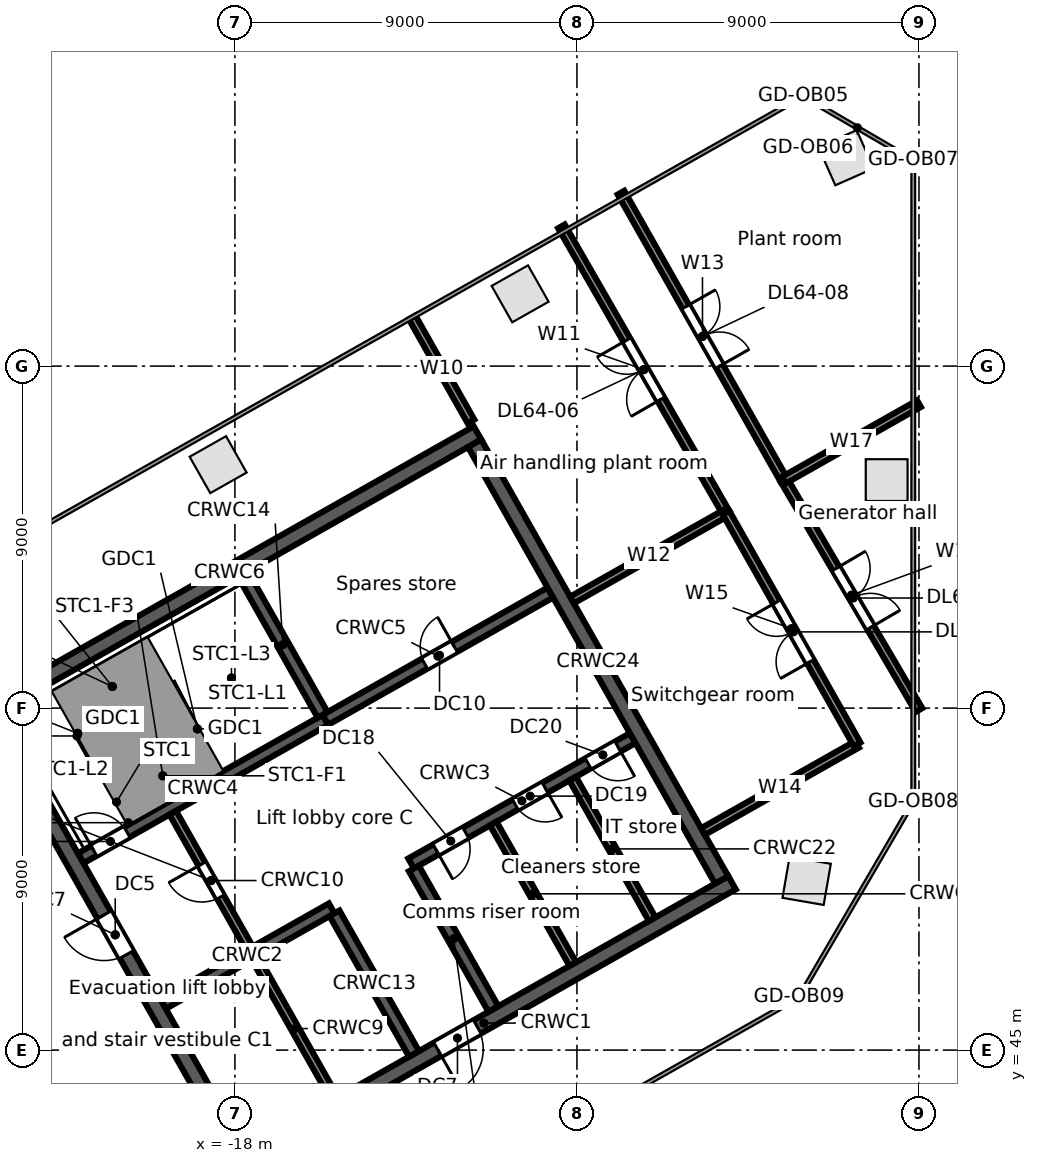
"""IFC4 building model, lengths in metres.
Left out: names, types, materials, properties, quantities, classifications, styles, units other than length and angle.
Written with IfcOpenShell. Run it as: python <this file> out.ifc"""

import sys

from ifc_helpers import new_model, si_unit, direction, frame, frame_2d, origin, origin_2d, place, context, subcontext, project, spatial, rectangle, extrude, element, fill, save


model = new_model("IFC4")
c1 = context("Model", 3, precision=1e-05, world=origin(), true_north=direction((0.0, 1.0)))
c2 = subcontext(c1, "Body", "Model", "MODEL_VIEW")
j1 = project(units=[si_unit("LENGTHUNIT", "METRE"), si_unit("PLANEANGLEUNIT", "RADIAN")], contexts=[c1])
p1 = place(None, origin())
s1 = spatial("IfcSite", under=j1, at=p1, CompositionType="ELEMENT")
p2 = place(p1, origin())
s2 = spatial("IfcBuilding", under=s1, at=p2, CompositionType="ELEMENT")
p3 = place(p2, frame((0.0, 0.0, 285.5)))
s3 = spatial("IfcBuildingStorey", under=s2, at=p3, CompositionType="ELEMENT", Elevation=285.5)
for number, where, z_axis, x_axis in (
    (1, (-10.495, 64.902, 0.0), (0.0, 0.0, 1.0), (-0.87, -0.492, 0.0)),
    (2, (-18.441, 60.406, 0.0), (0.0, 0.0, 1.0), (-0.87, -0.492, 0.0)),
    (3, (-2.955, 49.456, 0.0), (0.0, 0.0, 1.0), (-0.985, 0.171, 0.0)),
    (4, (-0.85, 60.0, 0.0), (0.0, 0.0, 1.0), (0.0, 1.0, 0.0)),
    (5, (-1.92, 68.483, 0.0), (0.0, 0.0, 1.0), (-0.915, -0.404, 0.0)),
):
    element("IfcColumn", number, at=place(p3, frame(where, z_axis=z_axis, x_axis=x_axis)), inside=s3, PredefinedType="COLUMN", context=c2, shape_type="SweptSolid", body=[
        extrude(rectangle(XDim=1.1, YDim=1.1, at=origin_2d()), origin(), (0.0, 0.0, 1.0), 7.6),
    ])
p4 = place(p3, frame((-17.975, 42.017, 0.0), z_axis=(0.0, 0.0, 1.0), x_axis=(0.87034965173, 0.492434243055, 0.0)))
e6 = element("IfcWall", 6, at=p4, inside=s3, PredefinedType="SOLIDWALL", context=c2, shape_type="SweptSolid", body=[
    extrude(rectangle(XDim=15.0, YDim=0.4, at=frame_2d((7.5, 0.0))), origin(), (0.0, 0.0, 1.0), 7.32),
])
p5 = place(p4, frame((6.1, 0.0, 0.0)))
e7 = element("IfcOpeningElement", 7, at=p5, cuts=e6, PredefinedType="OPENING", context=c2, shape_type="SweptSolid", body=[
    extrude(rectangle(XDim=1.2, YDim=2.1, at=frame_2d((0.6, 1.05))), frame((0.0, 0.21, 0.0), z_axis=(0.0, -1.0, 0.0), x_axis=(1.0, 0.0, 0.0)), (0.0, 0.0, 1.0), 0.42),
])
p6 = place(p3, frame((-19.892, 46.218, 0.0), z_axis=(0.0, 0.0, 1.0), x_axis=(0.870341639186, 0.492448404505, 0.0)))
e8 = element("IfcWall", 8, at=p6, inside=s3, PredefinedType="SOLIDWALL", context=c2, shape_type="SweptSolid", body=[
    extrude(rectangle(XDim=5.1, YDim=0.3, at=frame_2d((2.55, 0.0))), origin(), (0.0, 0.0, 1.0), 7.32),
])
p7 = place(p3, frame((-13.365, 49.911, 0.0), z_axis=(0.0, 0.0, 1.0), x_axis=(0.870347618718, 0.492437836272, 0.0)))
e9 = element("IfcWall", 9, at=p7, inside=s3, PredefinedType="SOLIDWALL", context=c2, shape_type="SweptSolid", body=[
    extrude(rectangle(XDim=6.7, YDim=0.3, at=frame_2d((3.35, 0.0))), origin(), (0.0, 0.0, 1.0), 7.32),
])
p8 = place(p7, frame((0.75, 0.0, 0.0)))
e10 = element("IfcOpeningElement", 10, at=p8, cuts=e9, PredefinedType="OPENING", context=c2, shape_type="SweptSolid", body=[
    extrude(rectangle(XDim=0.9, YDim=2.1, at=frame_2d((0.45, 1.05))), frame((0.0, 0.16, 0.0), z_axis=(0.0, -1.0, 0.0), x_axis=(1.0, 0.0, 0.0)), (0.0, 0.0, 1.0), 0.32),
])
p9 = place(p7, frame((3.15, 0.0, 0.0)))
e11 = element("IfcOpeningElement", 11, at=p9, cuts=e9, PredefinedType="OPENING", context=c2, shape_type="SweptSolid", body=[
    extrude(rectangle(XDim=0.9, YDim=2.1, at=frame_2d((0.45, 1.05))), frame((0.0, 0.16, 0.0), z_axis=(0.0, -1.0, 0.0), x_axis=(1.0, 0.0, 0.0)), (0.0, 0.0, 1.0), 0.32),
])
p10 = place(p7, frame((5.35, 0.0, 0.0)))
e12 = element("IfcOpeningElement", 12, at=p10, cuts=e9, PredefinedType="OPENING", context=c2, shape_type="SweptSolid", body=[
    extrude(rectangle(XDim=0.9, YDim=2.1, at=frame_2d((0.45, 1.05))), frame((0.0, 0.16, 0.0), z_axis=(0.0, -1.0, 0.0), x_axis=(1.0, 0.0, 0.0)), (0.0, 0.0, 1.0), 0.32),
])
p11 = place(p3, frame((-22.059, 50.047, 0.0), z_axis=(0.0, 0.0, 1.0), x_axis=(0.87035077051, 0.49243226567, 0.0)))
e13 = element("IfcWall", 13, at=p11, inside=s3, PredefinedType="SOLIDWALL", context=c2, shape_type="SweptSolid", body=[
    extrude(rectangle(XDim=7.4, YDim=0.3, at=frame_2d((3.7, 0.0))), origin(), (0.0, 0.0, 1.0), 7.32),
])
p12 = place(p11, frame((0.4, 0.0, 0.0)))
e14 = element("IfcOpeningElement", 14, at=p12, cuts=e13, PredefinedType="OPENING", context=c2, shape_type="SweptSolid", body=[
    extrude(rectangle(XDim=1.0, YDim=2.1, at=frame_2d((0.5, 1.05))), frame((0.0, 0.16, 0.0), z_axis=(0.0, -1.0, 0.0), x_axis=(1.0, 0.0, 0.0)), (0.0, 0.0, 1.0), 0.32),
])
p13 = place(p3, frame((-15.618, 53.691, 0.0), z_axis=(0.0, 0.0, 1.0), x_axis=(0.870362830851, 0.492410948978, 0.0)))
e15 = element("IfcWall", 15, at=p13, inside=s3, PredefinedType="SOLIDWALL", context=c2, shape_type="SweptSolid", body=[
    extrude(rectangle(XDim=6.8, YDim=0.3, at=frame_2d((3.4, 0.0))), origin(), (0.0, 0.0, 1.0), 7.32),
])
p14 = place(p13, frame((3.0, 0.0, 0.0)))
e16 = element("IfcOpeningElement", 16, at=p14, cuts=e15, PredefinedType="OPENING", context=c2, shape_type="SweptSolid", body=[
    extrude(rectangle(XDim=0.9, YDim=2.1, at=frame_2d((0.45, 1.05))), frame((0.0, 0.16, 0.0), z_axis=(0.0, -1.0, 0.0), x_axis=(1.0, 0.0, 0.0)), (0.0, 0.0, 1.0), 0.32),
])
p15 = place(p3, frame((-24.672, 53.854, 0.0), z_axis=(0.0, 0.0, 1.0), x_axis=(0.870353598469, 0.492427267353, 0.0)))
e17 = element("IfcWall", 17, at=p15, inside=s3, PredefinedType="SOLIDWALL", context=c2, shape_type="SweptSolid", body=[
    extrude(rectangle(XDim=15.0, YDim=0.4, at=frame_2d((7.5, 0.0))), origin(), (0.0, 0.0, 1.0), 7.32),
])
p16 = place(p3, frame((-24.4, 53.779, 0.0), z_axis=(0.0, 0.0, 1.0), x_axis=(0.492421663121, -0.870356769198, 0.0)))
e18 = element("IfcWall", 18, at=p16, inside=s3, PredefinedType="SOLIDWALL", context=c2, shape_type="SweptSolid", body=[
    extrude(rectangle(XDim=13.2, YDim=0.4, at=frame_2d((6.6, 0.0))), origin(), (0.0, 0.0, 1.0), 7.32),
])
p17 = place(p16, frame((6.0, 0.0, 0.0)))
e19 = element("IfcOpeningElement", 19, at=p17, cuts=e18, PredefinedType="OPENING", context=c2, shape_type="SweptSolid", body=[
    extrude(rectangle(XDim=1.2, YDim=2.1, at=frame_2d((0.6, 1.05))), frame((0.0, 0.21, 0.0), z_axis=(0.0, -1.0, 0.0), x_axis=(1.0, 0.0, 0.0)), (0.0, 0.0, 1.0), 0.42),
])
p18 = place(p3, frame((-17.469, 47.417, 0.0), z_axis=(0.0, 0.0, 1.0), x_axis=(0.492466057713, -0.870331650579, 0.0)))
e20 = element("IfcWall", 20, at=p18, inside=s3, PredefinedType="SOLIDWALL", context=c2, shape_type="SweptSolid", body=[
    extrude(rectangle(XDim=4.25, YDim=0.2, at=frame_2d((2.125, 0.0))), origin(), (0.0, 0.0, 1.0), 7.32),
])
p19 = place(p3, frame((-19.635, 51.246, 0.0), z_axis=(0.0, 0.0, 1.0), x_axis=(0.492408451753, -0.87036424366, 0.0)))
e21 = element("IfcWall", 21, at=p19, inside=s3, PredefinedType="PARTITIONING", context=c2, shape_type="SweptSolid", body=[
    extrude(rectangle(XDim=4.1, YDim=0.2, at=frame_2d((2.05, 0.0))), origin(), (0.0, 0.0, 1.0), 7.32),
])
p20 = place(p19, frame((1.55, 0.0, 0.0)))
e22 = element("IfcOpeningElement", 22, at=p20, cuts=e21, PredefinedType="OPENING", context=c2, shape_type="SweptSolid", body=[
    extrude(rectangle(XDim=1.0, YDim=2.1, at=frame_2d((0.5, 1.05))), frame((0.0, 0.11, 0.0), z_axis=(0.0, -1.0, 0.0), x_axis=(1.0, 0.0, 0.0)), (0.0, 0.0, 1.0), 0.22),
])
for number, where, z_axis, x_axis in (
    (23, (-15.379, 48.599, 0.0), (0.0, 0.0, 1.0), (0.492, -0.87, 0.0)),
    (24, (-17.785, 57.521, 0.0), (0.0, 0.0, 1.0), (0.492, -0.87, 0.0)),
):
    element("IfcWall", number, at=place(p3, frame(where, z_axis=z_axis, x_axis=x_axis)), inside=s3, PredefinedType="SOLIDWALL", context=c2, shape_type="SweptSolid", body=[
        extrude(rectangle(XDim=4.25, YDim=0.3, at=frame_2d((2.125, 0.0))), origin(), (0.0, 0.0, 1.0), 7.32),
    ])
p21 = place(p3, frame((-13.291, 49.781, 0.0), z_axis=(0.0, 0.0, 1.0), x_axis=(0.492397924348, -0.870370199454, 0.0)))
e25 = element("IfcWall", 25, at=p21, inside=s3, PredefinedType="SOLIDWALL", context=c2, shape_type="SweptSolid", body=[
    extrude(rectangle(XDim=4.25, YDim=0.3, at=frame_2d((2.125, 0.0))), origin(), (0.0, 0.0, 1.0), 7.32),
])
p22 = place(p3, frame((-11.202, 50.962, 0.0), z_axis=(0.0, 0.0, 1.0), x_axis=(0.492441437811, -0.870345580977, 0.0)))
e26 = element("IfcWall", 26, at=p22, inside=s3, PredefinedType="PARTITIONING", context=c2, shape_type="SweptSolid", body=[
    extrude(rectangle(XDim=4.25, YDim=0.2, at=frame_2d((2.125, 0.0))), origin(), (0.0, 0.0, 1.0), 7.32),
])
p23 = place(p3, frame((-9.113, 52.144, 0.0), z_axis=(0.0, 0.0, 1.0), x_axis=(0.492422543467, -0.870356271124, 0.0)))
e27 = element("IfcWall", 27, at=p23, inside=s3, PredefinedType="PARTITIONING", context=c2, shape_type="SweptSolid", body=[
    extrude(rectangle(XDim=4.25, YDim=0.2, at=frame_2d((2.125, 0.0))), origin(), (0.0, 0.0, 1.0), 7.32),
])
p24 = place(p3, frame((-11.692, 60.968, 0.0), z_axis=(0.0, 0.0, 1.0), x_axis=(0.492421663121, -0.870356769198, 0.0)))
e28 = element("IfcWall", 28, at=p24, inside=s3, PredefinedType="SOLIDWALL", context=c2, shape_type="SweptSolid", body=[
    extrude(rectangle(XDim=13.2, YDim=0.4, at=frame_2d((6.6, 0.0))), origin(), (0.0, 0.0, 1.0), 7.32),
])
p25 = place(p3, frame((-13.337, 64.282, 0.0), z_axis=(0.0, 0.0, 1.0), x_axis=(0.492254242764, -0.870451469342, 0.0)))
e29 = element("IfcWall", 29, at=p25, inside=s3, PredefinedType="PARTITIONING", context=c2, shape_type="SweptSolid", body=[
    extrude(rectangle(XDim=3.145, YDim=0.2, at=frame_2d((1.572, 0.0))), origin(), (0.0, 0.0, 1.0), 6.688),
])
p26 = place(p3, frame((-9.408, 66.677, 0.0), z_axis=(0.0, 0.0, 1.0), x_axis=(0.498350836267, -0.866975457549, 0.0)))
e30 = element("IfcWall", 30, at=p26, inside=s3, PredefinedType="PARTITIONING", context=c2, shape_type="SweptSolid", body=[
    extrude(rectangle(XDim=8.695, YDim=0.2, at=frame_2d((4.347, 0.0))), origin(), (0.0, 0.0, 1.0), 6.5),
])
p27 = place(p26, frame((3.45, 0.0, 0.0)))
e31 = element("IfcOpeningElement", 31, at=p27, cuts=e30, PredefinedType="OPENING", context=c2, shape_type="SweptSolid", body=[
    extrude(rectangle(XDim=1.8, YDim=2.1, at=frame_2d((0.9, 1.05))), frame((0.0, 0.11, 0.0), z_axis=(0.0, -1.0, 0.0), x_axis=(1.0, 0.0, 0.0)), (0.0, 0.0, 1.0), 0.22),
])
p28 = place(p3, frame((-9.13, 56.845, 0.0), z_axis=(0.0, 0.0, 1.0), x_axis=(0.870376359509, 0.49238703558, 0.0)))
e32 = element("IfcWall", 32, at=p28, inside=s3, PredefinedType="PARTITIONING", context=c2, shape_type="SweptSolid", body=[
    extrude(rectangle(XDim=4.659, YDim=0.2, at=frame_2d((2.33, 0.0))), origin(), (0.0, 0.0, 1.0), 7.32),
])
p29 = place(p3, frame((-7.841, 67.564, 0.0), z_axis=(0.0, 0.0, 1.0), x_axis=(0.49330585857, -0.869855924795, 0.0)))
e33 = element("IfcWall", 33, at=p29, inside=s3, PredefinedType="PARTITIONING", context=c2, shape_type="SweptSolid", body=[
    extrude(rectangle(XDim=8.695, YDim=0.2, at=frame_2d((4.347, 0.0))), origin(), (0.0, 0.0, 1.0), 6.5),
])
p30 = place(p29, frame((3.45, 0.0, 0.0)))
e34 = element("IfcOpeningElement", 34, at=p30, cuts=e33, PredefinedType="OPENING", context=c2, shape_type="SweptSolid", body=[
    extrude(rectangle(XDim=1.8, YDim=2.1, at=frame_2d((0.9, 1.05))), frame((0.0, 0.11, 0.0), z_axis=(0.0, -1.0, 0.0), x_axis=(1.0, 0.0, 0.0)), (0.0, 0.0, 1.0), 0.22),
])
p31 = place(p3, frame((-5.683, 50.753, 0.0), z_axis=(0.0, 0.0, 1.0), x_axis=(0.870366606776, 0.492404274767, 0.0)))
e35 = element("IfcWall", 35, at=p31, inside=s3, PredefinedType="PARTITIONING", context=c2, shape_type="SweptSolid", body=[
    extrude(rectangle(XDim=4.659, YDim=0.2, at=frame_2d((2.33, 0.0))), origin(), (0.0, 0.0, 1.0), 6.6),
])
p32 = place(p3, frame((-5.075, 59.139, 0.0), z_axis=(0.0, 0.0, 1.0), x_axis=(0.492472114048, -0.870328223652, 0.0)))
e36 = element("IfcWall", 36, at=p32, inside=s3, PredefinedType="PARTITIONING", context=c2, shape_type="SweptSolid", body=[
    extrude(rectangle(XDim=7.0, YDim=0.2, at=frame_2d((3.5, 0.0))), origin(), (0.0, 0.0, 1.0), 6.6),
])
p33 = place(p32, frame((2.7, 0.0, 0.0)))
e37 = element("IfcOpeningElement", 37, at=p33, cuts=e36, PredefinedType="OPENING", context=c2, shape_type="SweptSolid", body=[
    extrude(rectangle(XDim=1.8, YDim=2.1, at=frame_2d((0.9, 1.05))), frame((0.0, 0.11, 0.0), z_axis=(0.0, -1.0, 0.0), x_axis=(1.0, 0.0, 0.0)), (0.0, 0.0, 1.0), 0.22),
])
p34 = place(p3, frame((-3.552, 60.001, 0.0), z_axis=(0.0, 0.0, 1.0), x_axis=(0.506112260372, -0.862467610929, 0.0)))
e38 = element("IfcWall", 38, at=p34, inside=s3, PredefinedType="PARTITIONING", context=c2, shape_type="SweptSolid", body=[
    extrude(rectangle(XDim=7.018, YDim=0.2, at=frame_2d((3.509, 0.0))), origin(), (0.0, 0.0, 1.0), 6.5),
])
p35 = place(p34, frame((2.7, 0.0, 0.0)))
e39 = element("IfcOpeningElement", 39, at=p35, cuts=e38, PredefinedType="OPENING", context=c2, shape_type="SweptSolid", body=[
    extrude(rectangle(XDim=1.8, YDim=2.1, at=frame_2d((0.9, 1.05))), frame((0.0, 0.11, 0.0), z_axis=(0.0, -1.0, 0.0), x_axis=(1.0, 0.0, 0.0)), (0.0, 0.0, 1.0), 0.22),
])
p36 = place(p3, frame((-3.552, 60.001, 0.0), z_axis=(0.0, 0.0, 1.0), x_axis=(0.870315394397, 0.492494786038, 0.0)))
e40 = element("IfcWall", 40, at=p36, inside=s3, PredefinedType="PARTITIONING", context=c2, shape_type="SweptSolid", body=[
    extrude(rectangle(XDim=4.081, YDim=0.2, at=frame_2d((2.041, 0.0))), origin(), (0.0, 0.0, 1.0), 6.5),
])
p37 = place(p12, origin())
e41 = element("IfcDoor", 41, at=p37, inside=s3, OperationType="SINGLE_SWING_LEFT", PredefinedType="DOOR", context=c2, shape_type="SweptSolid", body=[
    extrude(rectangle(XDim=1.0, YDim=2.1, at=frame_2d((0.5, 1.05))), frame((0.0, 0.025, 0.0), z_axis=(0.0, -1.0, 0.0), x_axis=(1.0, 0.0, 0.0)), (0.0, 0.0, 1.0), 0.05),
])
fill(e14, e41)
p38 = place(p20, frame((1.0, 0.0, 0.0), z_axis=(0.0, 0.0, 1.0), x_axis=(-1.0, 0.0, 0.0)))
e42 = element("IfcDoor", 42, at=p38, inside=s3, OperationType="SINGLE_SWING_RIGHT", PredefinedType="DOOR", context=c2, shape_type="SweptSolid", body=[
    extrude(rectangle(XDim=1.0, YDim=2.1, at=frame_2d((0.5, 1.05))), frame((0.0, 0.025, 0.0), z_axis=(0.0, -1.0, 0.0), x_axis=(1.0, 0.0, 0.0)), (0.0, 0.0, 1.0), 0.05),
])
fill(e22, e42)
p39 = place(p17, frame((1.2, 0.0, 0.0), z_axis=(0.0, 0.0, 1.0), x_axis=(-1.0, 0.0, 0.0)))
e43 = element("IfcDoor", 43, at=p39, inside=s3, OperationType="SINGLE_SWING_RIGHT", PredefinedType="DOOR", context=c2, shape_type="SweptSolid", body=[
    extrude(rectangle(XDim=1.2, YDim=2.1, at=frame_2d((0.6, 1.05))), frame((0.0, 0.025, 0.0), z_axis=(0.0, -1.0, 0.0), x_axis=(1.0, 0.0, 0.0)), (0.0, 0.0, 1.0), 0.05),
])
fill(e19, e43)
p40 = place(p5, frame((1.2, 0.0, 0.0), z_axis=(0.0, 0.0, 1.0), x_axis=(-1.0, 0.0, 0.0)))
e44 = element("IfcDoor", 44, at=p40, inside=s3, OperationType="SINGLE_SWING_RIGHT", PredefinedType="DOOR", context=c2, shape_type="SweptSolid", body=[
    extrude(rectangle(XDim=1.2, YDim=2.1, at=frame_2d((0.6, 1.05))), frame((0.0, 0.025, 0.0), z_axis=(0.0, -1.0, 0.0), x_axis=(1.0, 0.0, 0.0)), (0.0, 0.0, 1.0), 0.05),
])
fill(e7, e44)
p41 = place(p14, origin())
e45 = element("IfcDoor", 45, at=p41, inside=s3, OperationType="SINGLE_SWING_RIGHT", PredefinedType="DOOR", context=c2, shape_type="SweptSolid", body=[
    extrude(rectangle(XDim=0.9, YDim=2.1, at=frame_2d((0.45, 1.05))), frame((0.0, 0.025, 0.0), z_axis=(0.0, -1.0, 0.0), x_axis=(1.0, 0.0, 0.0)), (0.0, 0.0, 1.0), 0.05),
])
fill(e16, e45)
p42 = place(p8, frame((0.9, 0.0, 0.0), z_axis=(0.0, 0.0, 1.0), x_axis=(-1.0, 0.0, 0.0)))
e46 = element("IfcDoor", 46, at=p42, inside=s3, OperationType="SINGLE_SWING_RIGHT", PredefinedType="DOOR", context=c2, shape_type="SweptSolid", body=[
    extrude(rectangle(XDim=0.9, YDim=2.1, at=frame_2d((0.45, 1.05))), frame((0.0, 0.025, 0.0), z_axis=(0.0, -1.0, 0.0), x_axis=(1.0, 0.0, 0.0)), (0.0, 0.0, 1.0), 0.05),
])
fill(e10, e46)
p43 = place(p9, frame((0.9, 0.0, 0.0), z_axis=(0.0, 0.0, 1.0), x_axis=(-1.0, 0.0, 0.0)))
e47 = element("IfcDoor", 47, at=p43, inside=s3, OperationType="SINGLE_SWING_LEFT", PredefinedType="DOOR", context=c2, shape_type="SweptSolid", body=[
    extrude(rectangle(XDim=0.9, YDim=2.1, at=frame_2d((0.45, 1.05))), frame((0.0, 0.025, 0.0), z_axis=(0.0, -1.0, 0.0), x_axis=(1.0, 0.0, 0.0)), (0.0, 0.0, 1.0), 0.05),
])
fill(e11, e47)
p44 = place(p10, frame((0.9, 0.0, 0.0), z_axis=(0.0, 0.0, 1.0), x_axis=(-1.0, 0.0, 0.0)))
e48 = element("IfcDoor", 48, at=p44, inside=s3, OperationType="SINGLE_SWING_LEFT", PredefinedType="DOOR", context=c2, shape_type="SweptSolid", body=[
    extrude(rectangle(XDim=0.9, YDim=2.1, at=frame_2d((0.45, 1.05))), frame((0.0, 0.025, 0.0), z_axis=(0.0, -1.0, 0.0), x_axis=(1.0, 0.0, 0.0)), (0.0, 0.0, 1.0), 0.05),
])
fill(e12, e48)
p45 = place(p33, frame((1.8, 0.0, 0.0), z_axis=(0.0, 0.0, 1.0), x_axis=(-1.0, 0.0, 0.0)))
e49 = element("IfcDoor", 49, at=p45, inside=s3, OperationType="DOUBLE_DOOR_SINGLE_SWING", PredefinedType="DOOR", context=c2, shape_type="SweptSolid", body=[
    extrude(rectangle(XDim=1.8, YDim=2.1, at=frame_2d((0.9, 1.05))), frame((0.0, 0.025, 0.0), z_axis=(0.0, -1.0, 0.0), x_axis=(1.0, 0.0, 0.0)), (0.0, 0.0, 1.0), 0.05),
])
fill(e37, e49)
p46 = place(p27, frame((1.8, 0.0, 0.0), z_axis=(0.0, 0.0, 1.0), x_axis=(-1.0, 0.0, 0.0)))
e50 = element("IfcDoor", 50, at=p46, inside=s3, OperationType="DOUBLE_DOOR_SINGLE_SWING", PredefinedType="DOOR", context=c2, shape_type="SweptSolid", body=[
    extrude(rectangle(XDim=1.8, YDim=2.1, at=frame_2d((0.9, 1.05))), frame((0.0, 0.025, 0.0), z_axis=(0.0, -1.0, 0.0), x_axis=(1.0, 0.0, 0.0)), (0.0, 0.0, 1.0), 0.05),
])
fill(e31, e50)
p47 = place(p35, origin())
e51 = element("IfcDoor", 51, at=p47, inside=s3, OperationType="DOUBLE_DOOR_SINGLE_SWING", PredefinedType="DOOR", context=c2, shape_type="SweptSolid", body=[
    extrude(rectangle(XDim=1.8, YDim=2.1, at=frame_2d((0.9, 1.05))), frame((0.0, 0.025, 0.0), z_axis=(0.0, -1.0, 0.0), x_axis=(1.0, 0.0, 0.0)), (0.0, 0.0, 1.0), 0.05),
])
fill(e39, e51)
p48 = place(p30, origin())
e52 = element("IfcDoor", 52, at=p48, inside=s3, OperationType="DOUBLE_DOOR_SINGLE_SWING", PredefinedType="DOOR", context=c2, shape_type="SweptSolid", body=[
    extrude(rectangle(XDim=1.8, YDim=2.1, at=frame_2d((0.9, 1.05))), frame((0.0, 0.025, 0.0), z_axis=(0.0, -1.0, 0.0), x_axis=(1.0, 0.0, 0.0)), (0.0, 0.0, 1.0), 0.05),
])
fill(e34, e52)
save(model, sys.argv[1])
